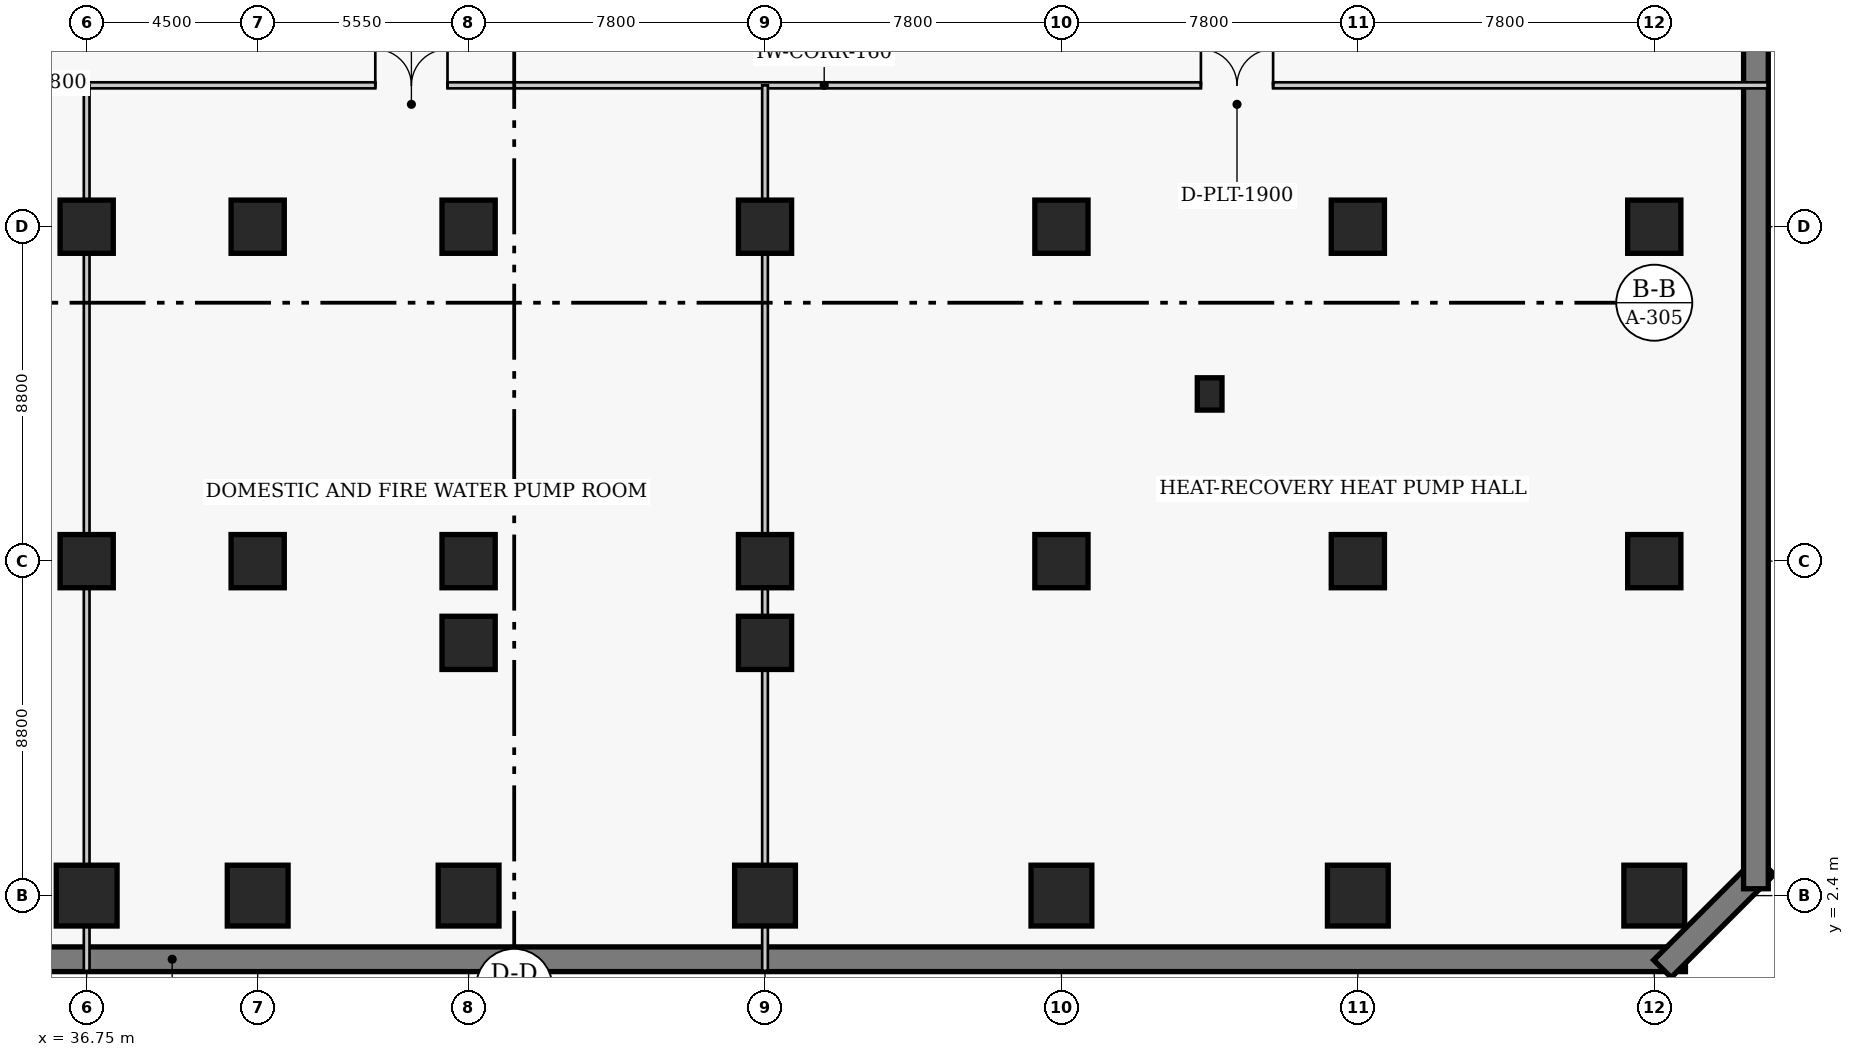
"""IFC4 building model, lengths in metres.
Left out: names, types, materials, properties, quantities, classifications, styles, units other than length and angle.
Written with IfcOpenShell. Run it as: python <this file> out.ifc"""

import sys

from ifc_helpers import new_model, si_unit, direction, frame, frame_2d, origin, origin_2d, place, context, subcontext, project, spatial, rectangle, extrude, element, fill, save


model = new_model("IFC4")
c1 = context("Model", 3, precision=1e-05, world=origin(), true_north=direction((0.0, 1.0)))
c2 = subcontext(c1, "Body", "Model", "MODEL_VIEW")
j1 = project(units=[si_unit("LENGTHUNIT", "METRE"), si_unit("PLANEANGLEUNIT", "RADIAN")], contexts=[c1])
p1 = place(None, origin())
s1 = spatial("IfcSite", under=j1, at=p1, CompositionType="ELEMENT")
p2 = place(p1, origin())
s2 = spatial("IfcBuilding", under=s1, at=p2, CompositionType="ELEMENT")
p3 = place(p2, frame((0.0, 0.0, -9.0)))
s3 = spatial("IfcBuildingStorey", under=s2, at=p3, CompositionType="ELEMENT", Elevation=-9.0)
p4 = place(p3, frame((-0.82, 0.725, 0.0), z_axis=(0.0, 0.0, 1.0), x_axis=(1.0, 0.0, 0.0)))
e1 = element("IfcWall", 1, at=p4, inside=s3, PredefinedType="USERDEFINED", context=c2, shape_type="SweptSolid", body=[
    extrude(rectangle(XDim=79.64, YDim=0.65, at=frame_2d((39.82, 0.0))), origin(), (0.0, 0.0, 1.0), 4.18),
])
p5 = place(p3, frame((78.215, 0.474, 0.0), z_axis=(0.0, 0.0, 1.0), x_axis=(0.707106781187, 0.707106781187, 0.0)))
e2 = element("IfcWall", 2, at=p5, inside=s3, PredefinedType="USERDEFINED", context=c2, shape_type="SweptSolid", body=[
    extrude(rectangle(XDim=3.834, YDim=0.65, at=frame_2d((1.917, 0.0))), origin(), (0.0, 0.0, 1.0), 4.18),
])
p6 = place(p3, frame((80.675, 2.58, 0.0), z_axis=(0.0, 0.0, 1.0), x_axis=(0.0, 1.0, 0.0)))
e3 = element("IfcWall", 3, at=p6, inside=s3, PredefinedType="USERDEFINED", context=c2, shape_type="SweptSolid", body=[
    extrude(rectangle(XDim=46.84, YDim=0.65, at=frame_2d((23.42, 0.0))), origin(), (0.0, 0.0, 1.0), 4.18),
])
p7 = place(p3, frame((36.75, 2.4, 0.0), z_axis=(0.0, 0.0, 1.0), x_axis=(1.0, 0.0, 0.0)))
e4 = element("IfcColumn", 4, at=p7, inside=s3, PredefinedType="COLUMN", context=c2, shape_type="SweptSolid", body=[
    extrude(rectangle(XDim=1.6, YDim=1.6, at=origin_2d()), origin(), (0.0, 0.0, 1.0), 4.5),
])
for number, where, z_axis, x_axis in (
    (5, (36.75, 11.2, 0.0), (0.0, 0.0, 1.0), (1.0, 0.0, 0.0)),
    (6, (36.75, 20.0, 0.0), (0.0, 0.0, 1.0), (1.0, 0.0, 0.0)),
):
    element("IfcColumn", number, at=place(p3, frame(where, z_axis=z_axis, x_axis=x_axis)), inside=s3, PredefinedType="COLUMN", context=c2, shape_type="SweptSolid", body=[
        extrude(rectangle(XDim=1.4, YDim=1.4, at=origin_2d()), origin(), (0.0, 0.0, 1.0), 4.5),
    ])
p8 = place(p3, frame((41.25, 2.4, 0.0), z_axis=(0.0, 0.0, 1.0), x_axis=(1.0, 0.0, 0.0)))
e7 = element("IfcColumn", 7, at=p8, inside=s3, PredefinedType="COLUMN", context=c2, shape_type="SweptSolid", body=[
    extrude(rectangle(XDim=1.6, YDim=1.6, at=origin_2d()), origin(), (0.0, 0.0, 1.0), 4.5),
])
for number, where, z_axis, x_axis in (
    (8, (41.25, 11.2, 0.0), (0.0, 0.0, 1.0), (1.0, 0.0, 0.0)),
    (9, (41.25, 20.0, 0.0), (0.0, 0.0, 1.0), (1.0, 0.0, 0.0)),
):
    element("IfcColumn", number, at=place(p3, frame(where, z_axis=z_axis, x_axis=x_axis)), inside=s3, PredefinedType="COLUMN", context=c2, shape_type="SweptSolid", body=[
        extrude(rectangle(XDim=1.4, YDim=1.4, at=origin_2d()), origin(), (0.0, 0.0, 1.0), 4.5),
    ])
p9 = place(p3, frame((46.8, 2.4, 0.0), z_axis=(0.0, 0.0, 1.0), x_axis=(1.0, 0.0, 0.0)))
e10 = element("IfcColumn", 10, at=p9, inside=s3, PredefinedType="COLUMN", context=c2, shape_type="SweptSolid", body=[
    extrude(rectangle(XDim=1.6, YDim=1.6, at=origin_2d()), origin(), (0.0, 0.0, 1.0), 4.5),
])
for number, where, z_axis, x_axis in (
    (11, (46.8, 11.2, 0.0), (0.0, 0.0, 1.0), (1.0, 0.0, 0.0)),
    (12, (46.8, 20.0, 0.0), (0.0, 0.0, 1.0), (1.0, 0.0, 0.0)),
):
    element("IfcColumn", number, at=place(p3, frame(where, z_axis=z_axis, x_axis=x_axis)), inside=s3, PredefinedType="COLUMN", context=c2, shape_type="SweptSolid", body=[
        extrude(rectangle(XDim=1.4, YDim=1.4, at=origin_2d()), origin(), (0.0, 0.0, 1.0), 4.5),
    ])
p10 = place(p3, frame((54.6, 2.4, 0.0), z_axis=(0.0, 0.0, 1.0), x_axis=(1.0, 0.0, 0.0)))
e13 = element("IfcColumn", 13, at=p10, inside=s3, PredefinedType="COLUMN", context=c2, shape_type="SweptSolid", body=[
    extrude(rectangle(XDim=1.6, YDim=1.6, at=origin_2d()), origin(), (0.0, 0.0, 1.0), 4.5),
])
for number, where, z_axis, x_axis in (
    (14, (54.6, 11.2, 0.0), (0.0, 0.0, 1.0), (1.0, 0.0, 0.0)),
    (15, (54.6, 20.0, 0.0), (0.0, 0.0, 1.0), (1.0, 0.0, 0.0)),
):
    element("IfcColumn", number, at=place(p3, frame(where, z_axis=z_axis, x_axis=x_axis)), inside=s3, PredefinedType="COLUMN", context=c2, shape_type="SweptSolid", body=[
        extrude(rectangle(XDim=1.4, YDim=1.4, at=origin_2d()), origin(), (0.0, 0.0, 1.0), 4.5),
    ])
p11 = place(p3, frame((62.4, 2.4, 0.0), z_axis=(0.0, 0.0, 1.0), x_axis=(1.0, 0.0, 0.0)))
e16 = element("IfcColumn", 16, at=p11, inside=s3, PredefinedType="COLUMN", context=c2, shape_type="SweptSolid", body=[
    extrude(rectangle(XDim=1.6, YDim=1.6, at=origin_2d()), origin(), (0.0, 0.0, 1.0), 4.5),
])
for number, where, z_axis, x_axis in (
    (17, (62.4, 11.2, 0.0), (0.0, 0.0, 1.0), (1.0, 0.0, 0.0)),
    (18, (62.4, 20.0, 0.0), (0.0, 0.0, 1.0), (1.0, 0.0, 0.0)),
):
    element("IfcColumn", number, at=place(p3, frame(where, z_axis=z_axis, x_axis=x_axis)), inside=s3, PredefinedType="COLUMN", context=c2, shape_type="SweptSolid", body=[
        extrude(rectangle(XDim=1.4, YDim=1.4, at=origin_2d()), origin(), (0.0, 0.0, 1.0), 4.5),
    ])
p12 = place(p3, frame((70.2, 2.4, 0.0), z_axis=(0.0, 0.0, 1.0), x_axis=(1.0, 0.0, 0.0)))
e19 = element("IfcColumn", 19, at=p12, inside=s3, PredefinedType="COLUMN", context=c2, shape_type="SweptSolid", body=[
    extrude(rectangle(XDim=1.6, YDim=1.6, at=origin_2d()), origin(), (0.0, 0.0, 1.0), 4.5),
])
for number, where, z_axis, x_axis in (
    (20, (70.2, 11.2, 0.0), (0.0, 0.0, 1.0), (1.0, 0.0, 0.0)),
    (21, (70.2, 20.0, 0.0), (0.0, 0.0, 1.0), (1.0, 0.0, 0.0)),
):
    element("IfcColumn", number, at=place(p3, frame(where, z_axis=z_axis, x_axis=x_axis)), inside=s3, PredefinedType="COLUMN", context=c2, shape_type="SweptSolid", body=[
        extrude(rectangle(XDim=1.4, YDim=1.4, at=origin_2d()), origin(), (0.0, 0.0, 1.0), 4.5),
    ])
p13 = place(p3, frame((78.0, 2.4, 0.0), z_axis=(0.0, 0.0, 1.0), x_axis=(1.0, 0.0, 0.0)))
e22 = element("IfcColumn", 22, at=p13, inside=s3, PredefinedType="COLUMN", context=c2, shape_type="SweptSolid", body=[
    extrude(rectangle(XDim=1.6, YDim=1.6, at=origin_2d()), origin(), (0.0, 0.0, 1.0), 4.5),
])
for number, where, z_axis, x_axis in (
    (23, (78.0, 11.2, 0.0), (0.0, 0.0, 1.0), (1.0, 0.0, 0.0)),
    (24, (78.0, 20.0, 0.0), (0.0, 0.0, 1.0), (1.0, 0.0, 0.0)),
    (25, (46.8, 9.05, 0.0), (0.0, 0.0, 1.0), (1.0, 0.0, 0.0)),
    (26, (54.6, 9.05, 0.0), (0.0, 0.0, 1.0), (1.0, 0.0, 0.0)),
):
    element("IfcColumn", number, at=place(p3, frame(where, z_axis=z_axis, x_axis=x_axis)), inside=s3, PredefinedType="COLUMN", context=c2, shape_type="SweptSolid", body=[
        extrude(rectangle(XDim=1.4, YDim=1.4, at=origin_2d()), origin(), (0.0, 0.0, 1.0), 4.5),
    ])
p14 = place(p3, frame((66.3, 15.6, 0.0), z_axis=(0.0, 0.0, 1.0), x_axis=(1.0, 0.0, 0.0)))
e27 = element("IfcColumn", 27, at=p14, inside=s3, PredefinedType="PILASTER", context=c2, shape_type="SweptSolid", body=[
    extrude(rectangle(XDim=0.65, YDim=0.85, at=origin_2d()), origin(), (0.0, 0.0, 1.0), 4.5),
])
p15 = place(p3, frame((-2.98, 23.72, 0.0), z_axis=(0.0, 0.0, 1.0), x_axis=(1.0, 0.0, 0.0)))
e28 = element("IfcWall", 28, at=p15, inside=s3, PredefinedType="PARTITIONING", context=c2, shape_type="SweptSolid", body=[
    extrude(rectangle(XDim=83.96, YDim=0.16, at=frame_2d((41.98, 0.0))), origin(), (0.0, 0.0, 1.0), 4.18),
])
p16 = place(p15, frame((11.98, 0.0, 0.0)))
e29 = element("IfcOpeningElement", 29, at=p16, cuts=e28, PredefinedType="OPENING", context=c2, shape_type="SweptSolid", body=[
    extrude(rectangle(XDim=1.1, YDim=2.15, at=frame_2d((0.55, 1.075))), frame((0.0, 0.09, 0.0), z_axis=(0.0, -1.0, 0.0), x_axis=(1.0, 0.0, 0.0)), (0.0, 0.0, 1.0), 0.18),
])
p17 = place(p15, frame((4.8, 0.0, 0.0)))
e30 = element("IfcOpeningElement", 30, at=p17, cuts=e28, PredefinedType="OPENING", context=c2, shape_type="SweptSolid", body=[
    extrude(rectangle(XDim=1.9, YDim=2.25, at=frame_2d((0.95, 1.125))), frame((0.0, 0.09, 0.0), z_axis=(0.0, -1.0, 0.0), x_axis=(1.0, 0.0, 0.0)), (0.0, 0.0, 1.0), 0.18),
])
p18 = place(p15, frame((27.3, 0.0, 0.0)))
e31 = element("IfcOpeningElement", 31, at=p18, cuts=e28, PredefinedType="OPENING", context=c2, shape_type="SweptSolid", body=[
    extrude(rectangle(XDim=1.9, YDim=2.25, at=frame_2d((0.95, 1.125))), frame((0.0, 0.09, 0.0), z_axis=(0.0, -1.0, 0.0), x_axis=(1.0, 0.0, 0.0)), (0.0, 0.0, 1.0), 0.18),
])
p19 = place(p15, frame((47.325, 0.0, 0.0)))
e32 = element("IfcOpeningElement", 32, at=p19, cuts=e28, PredefinedType="OPENING", context=c2, shape_type="SweptSolid", body=[
    extrude(rectangle(XDim=1.9, YDim=2.25, at=frame_2d((0.95, 1.125))), frame((0.0, 0.09, 0.0), z_axis=(0.0, -1.0, 0.0), x_axis=(1.0, 0.0, 0.0)), (0.0, 0.0, 1.0), 0.18),
])
p20 = place(p15, frame((69.05, 0.0, 0.0)))
e33 = element("IfcOpeningElement", 33, at=p20, cuts=e28, PredefinedType="OPENING", context=c2, shape_type="SweptSolid", body=[
    extrude(rectangle(XDim=1.9, YDim=2.25, at=frame_2d((0.95, 1.125))), frame((0.0, 0.09, 0.0), z_axis=(0.0, -1.0, 0.0), x_axis=(1.0, 0.0, 0.0)), (0.0, 0.0, 1.0), 0.18),
])
for number, where, z_axis, x_axis in (
    (34, (36.75, 0.42, 0.0), (0.0, 0.0, 1.0), (0.0, 1.0, 0.0)),
    (35, (54.6, 0.42, 0.0), (0.0, 0.0, 1.0), (0.0, 1.0, 0.0)),
):
    element("IfcWall", number, at=place(p3, frame(where, z_axis=z_axis, x_axis=x_axis)), inside=s3, PredefinedType="PARTITIONING", context=c2, shape_type="SweptSolid", body=[
        extrude(rectangle(XDim=23.3, YDim=0.15, at=frame_2d((11.65, 0.0))), origin(), (0.0, 0.0, 1.0), 3.14),
    ])
p21 = place(p19, origin())
e36 = element("IfcDoor", 36, at=p21, inside=s3, OperationType="DOUBLE_DOOR_SINGLE_SWING", PredefinedType="DOOR", context=c2, shape_type="SweptSolid", body=[
    extrude(rectangle(XDim=1.9, YDim=2.25, at=frame_2d((0.95, 1.125))), frame((0.0, 0.025, 0.0), z_axis=(0.0, -1.0, 0.0), x_axis=(1.0, 0.0, 0.0)), (0.0, 0.0, 1.0), 0.05),
])
fill(e32, e36)
p22 = place(p20, origin())
e37 = element("IfcDoor", 37, at=p22, inside=s3, OperationType="DOUBLE_DOOR_SINGLE_SWING", PredefinedType="DOOR", context=c2, shape_type="SweptSolid", body=[
    extrude(rectangle(XDim=1.9, YDim=2.25, at=frame_2d((0.95, 1.125))), frame((0.0, 0.025, 0.0), z_axis=(0.0, -1.0, 0.0), x_axis=(1.0, 0.0, 0.0)), (0.0, 0.0, 1.0), 0.05),
])
fill(e33, e37)
save(model, sys.argv[1])
